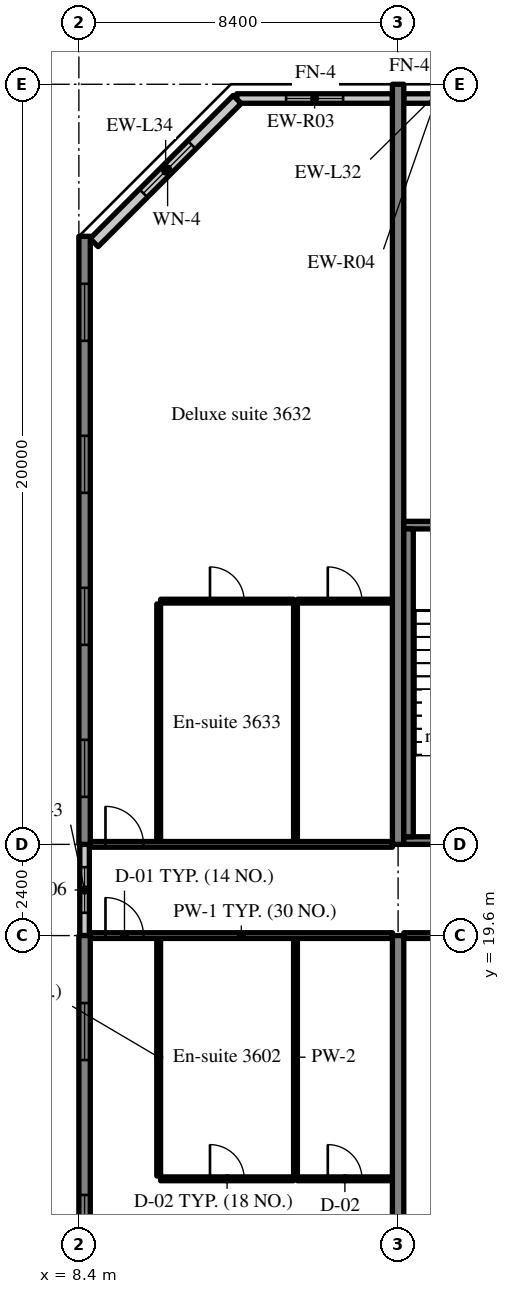
"""IFC4 building model, lengths in metres.
Left out: names, types, materials, properties, quantities, classifications, styles, units other than length and angle.
Written with IfcOpenShell. Run it as: python <this file> out.ifc"""

import sys

from ifc_helpers import new_model, si_unit, direction, frame, frame_2d, origin, place, context, subcontext, project, spatial, rectangle, extrude, source, transform, mapped, element, fill, save


model = new_model("IFC4")
c1 = context("Model", 3, precision=1e-05, world=origin(), true_north=direction((0.0, 1.0)))
c2 = subcontext(c1, "Body", "Model", "MODEL_VIEW")
j1 = project(units=[si_unit("LENGTHUNIT", "METRE"), si_unit("PLANEANGLEUNIT", "RADIAN")], contexts=[c1])
p1 = place(None, origin())
s1 = spatial("IfcSite", under=j1, at=p1, CompositionType="ELEMENT")
p2 = place(p1, origin())
s2 = spatial("IfcBuilding", under=s1, at=p2, CompositionType="ELEMENT")
p3 = place(p2, frame((0.0, 0.0, 151.6)))
s3 = spatial("IfcBuildingStorey", under=s2, at=p3, CompositionType="ELEMENT", Elevation=151.6)
m1 = source(origin(), c2, "Body", "SweptSolid", [
    extrude(rectangle(XDim=10.1, YDim=0.3, at=frame_2d((5.05, 0.0))), origin(), (0.0, 0.0, 1.0), 3.52),
])
p4 = place(p3, frame((8.55, 9.5, 0.0), z_axis=(0.0, 0.0, 1.0), x_axis=(0.0, 1.0, 0.0)))
e1 = element("IfcWall", 1, at=p4, inside=s3, PredefinedType="SHEAR", context=c2, shape_type="MappedRepresentation", body=[
    mapped(m1, transform((0.0, 0.0, 0.0), scale=1.0)),
])
m2 = source(origin(), c2, "Body", "SweptSolid", [
    extrude(rectangle(XDim=1.5, YDim=1.5, at=frame_2d((0.75, 0.75))), frame((0.0, 0.16, 0.0), z_axis=(0.0, -1.0, 0.0), x_axis=(1.0, 0.0, 0.0)), (0.0, 0.0, 1.0), 0.32),
])
p5 = place(p4, frame((1.775, 0.0, 0.9)))
e2 = element("IfcOpeningElement", 2, at=p5, cuts=e1, PredefinedType="OPENING", context=c2, shape_type="MappedRepresentation", body=[
    mapped(m2, transform((0.0, 0.0, 0.0), scale=1.0)),
])
p6 = place(p4, frame((6.825, 0.0, 0.9)))
e3 = element("IfcOpeningElement", 3, at=p6, cuts=e1, PredefinedType="OPENING", context=c2, shape_type="MappedRepresentation", body=[
    mapped(m2, transform((0.0, 0.0, 0.0), scale=1.0)),
])
m3 = source(origin(), c2, "Body", "SweptSolid", [
    extrude(rectangle(XDim=16.0, YDim=0.3, at=frame_2d((8.0, 0.0))), origin(), (0.0, 0.0, 1.0), 3.52),
])
p7 = place(p3, frame((8.55, 22.0, 0.0), z_axis=(0.0, 0.0, 1.0), x_axis=(0.0, 1.0, 0.0)))
e4 = element("IfcWall", 4, at=p7, inside=s3, PredefinedType="SHEAR", context=c2, shape_type="MappedRepresentation", body=[
    mapped(m3, transform((0.0, 0.0, 0.0), scale=1.0)),
])
p8 = place(p7, frame((1.25, 0.0, 0.9)))
e5 = element("IfcOpeningElement", 5, at=p8, cuts=e4, PredefinedType="OPENING", context=c2, shape_type="MappedRepresentation", body=[
    mapped(m2, transform((0.0, 0.0, 0.0), scale=1.0)),
])
p9 = place(p7, frame((5.25, 0.0, 0.9)))
e6 = element("IfcOpeningElement", 6, at=p9, cuts=e4, PredefinedType="OPENING", context=c2, shape_type="MappedRepresentation", body=[
    mapped(m2, transform((0.0, 0.0, 0.0), scale=1.0)),
])
p10 = place(p7, frame((9.25, 0.0, 0.9)))
e7 = element("IfcOpeningElement", 7, at=p10, cuts=e4, PredefinedType="OPENING", context=c2, shape_type="MappedRepresentation", body=[
    mapped(m2, transform((0.0, 0.0, 0.0), scale=1.0)),
])
p11 = place(p7, frame((13.25, 0.0, 0.9)))
e8 = element("IfcOpeningElement", 8, at=p11, cuts=e4, PredefinedType="OPENING", context=c2, shape_type="MappedRepresentation", body=[
    mapped(m2, transform((0.0, 0.0, 0.0), scale=1.0)),
])
m4 = source(origin(), c2, "Body", "SweptSolid", [
    extrude(rectangle(XDim=14.1, YDim=0.3, at=frame_2d((7.05, 0.0))), origin(), (0.0, 0.0, 1.0), 3.52),
])
p12 = place(p3, frame((16.8, 5.5, 0.0), z_axis=(0.0, 0.0, 1.0), x_axis=(0.0, 1.0, 0.0)))
e9 = element("IfcWall", 9, at=p12, inside=s3, PredefinedType="SHEAR", context=c2, shape_type="MappedRepresentation", body=[
    mapped(m4, transform((0.0, 0.0, 0.0), scale=1.0)),
])
m5 = source(origin(), c2, "Body", "SweptSolid", [
    extrude(rectangle(XDim=20.0, YDim=0.3, at=frame_2d((10.0, 0.0))), origin(), (0.0, 0.0, 1.0), 3.52),
])
p13 = place(p3, frame((16.8, 22.0, 0.0), z_axis=(0.0, 0.0, 1.0), x_axis=(0.0, 1.0, 0.0)))
e10 = element("IfcWall", 10, at=p13, inside=s3, PredefinedType="SHEAR", context=c2, shape_type="MappedRepresentation", body=[
    mapped(m5, transform((0.0, 0.0, 0.0), scale=1.0)),
])
m6 = source(origin(), c2, "Body", "SweptSolid", [
    extrude(rectangle(XDim=4.094, YDim=0.25, at=frame_2d((2.047, 0.0))), origin(), (0.0, 0.0, 1.0), 2.87),
])
p14 = place(p3, frame((16.65, 41.625, 0.0), z_axis=(0.0, 0.0, 1.0), x_axis=(-1.0, 0.0, 0.0)))
e11 = element("IfcWall", 11, at=p14, inside=s3, PredefinedType="SOLIDWALL", context=c2, shape_type="MappedRepresentation", body=[
    mapped(m6, transform((0.0, 0.0, 0.0), scale=1.0)),
])
m7 = source(origin(), c2, "Body", "SweptSolid", [
    extrude(rectangle(XDim=1.5, YDim=1.5, at=frame_2d((0.75, 0.75))), frame((0.0, 0.135, 0.0), z_axis=(0.0, -1.0, 0.0), x_axis=(1.0, 0.0, 0.0)), (0.0, 0.0, 1.0), 0.27),
])
p15 = place(p14, frame((1.297, 0.0, 0.9)))
e12 = element("IfcOpeningElement", 12, at=p15, cuts=e11, PredefinedType="OPENING", context=c2, shape_type="MappedRepresentation", body=[
    mapped(m7, transform((0.0, 0.0, 0.0), scale=1.0)),
])
m8 = source(origin(), c2, "Body", "SweptSolid", [
    extrude(rectangle(XDim=1.708, YDim=0.25, at=frame_2d((0.854, 0.0))), origin(), (0.0, 0.0, 1.0), 2.87),
])
p16 = place(p3, frame((18.658, 41.625, 0.0), z_axis=(0.0, 0.0, 1.0), x_axis=(-1.0, 0.0, 0.0)))
e13 = element("IfcWall", 13, at=p16, inside=s3, PredefinedType="SOLIDWALL", context=c2, shape_type="MappedRepresentation", body=[
    mapped(m8, transform((0.0, 0.0, 0.0), scale=1.0)),
])
m9 = source(origin(), c2, "Body", "SweptSolid", [
    extrude(rectangle(XDim=5.326, YDim=0.3, at=frame_2d((2.663, 0.0))), origin(), (0.0, 0.0, 1.0), 3.52),
])
p17 = place(p3, frame((12.566, 41.6, 0.0), z_axis=(0.0, 0.0, 1.0), x_axis=(-0.707083859269, -0.707129702361, 0.0)))
e14 = element("IfcWall", 14, at=p17, inside=s3, PredefinedType="SOLIDWALL", context=c2, shape_type="MappedRepresentation", body=[
    mapped(m9, transform((0.0, 0.0, 0.0), scale=1.0)),
])
m10 = source(origin(), c2, "Body", "SweptSolid", [
    extrude(rectangle(XDim=1.8, YDim=1.5, at=frame_2d((0.9, 0.75))), frame((0.0, 0.16, 0.0), z_axis=(0.0, -1.0, 0.0), x_axis=(1.0, 0.0, 0.0)), (0.0, 0.0, 1.0), 0.32),
])
p18 = place(p17, frame((1.689, 0.0, 0.9)))
e15 = element("IfcOpeningElement", 15, at=p18, cuts=e14, PredefinedType="OPENING", context=c2, shape_type="MappedRepresentation", body=[
    mapped(m10, transform((0.0, 0.0, 0.0), scale=1.0)),
])
m11 = source(origin(), c2, "Body", "SweptSolid", [
    extrude(rectangle(XDim=2.4, YDim=0.25, at=frame_2d((1.2, 0.0))), origin(), (0.0, 0.0, 1.0), 2.62),
])
p19 = place(p3, frame((8.55, 19.6, 0.0), z_axis=(0.0, 0.0, 1.0), x_axis=(0.0, 1.0, 0.0)))
e16 = element("IfcWall", 16, at=p19, inside=s3, PredefinedType="SOLIDWALL", context=c2, shape_type="MappedRepresentation", body=[
    mapped(m11, transform((0.0, 0.0, 0.0), scale=1.0)),
])
m12 = source(origin(), c2, "Body", "SweptSolid", [
    extrude(rectangle(XDim=1.2, YDim=1.5, at=frame_2d((0.6, 0.75))), frame((0.0, 0.135, 0.0), z_axis=(0.0, -1.0, 0.0), x_axis=(1.0, 0.0, 0.0)), (0.0, 0.0, 1.0), 0.27),
])
p20 = place(p19, frame((0.6, 0.0, 0.9)))
e17 = element("IfcOpeningElement", 17, at=p20, cuts=e16, PredefinedType="OPENING", context=c2, shape_type="MappedRepresentation", body=[
    mapped(m12, transform((0.0, 0.0, 0.0), scale=1.0)),
])
m13 = source(origin(), c2, "Body", "SweptSolid", [
    extrude(rectangle(XDim=8.25, YDim=0.2, at=frame_2d((4.125, 0.0))), origin(), (0.0, 0.0, 1.0), 3.52),
])
p21 = place(p3, frame((16.95, 22.1, 0.0), z_axis=(0.0, 0.0, 1.0), x_axis=(1.0, 0.0, 0.0)))
e18 = element("IfcWall", 18, at=p21, inside=s3, PredefinedType="SOLIDWALL", context=c2, shape_type="MappedRepresentation", body=[
    mapped(m13, transform((0.0, 0.0, 0.0), scale=1.0)),
])
m14 = source(origin(), c2, "Body", "SweptSolid", [
    extrude(rectangle(XDim=1.2, YDim=2.1, at=frame_2d((0.6, 1.05))), frame((0.0, 0.11, 0.0), z_axis=(0.0, -1.0, 0.0), x_axis=(1.0, 0.0, 0.0)), (0.0, 0.0, 1.0), 0.22),
])
p22 = place(p21, frame((6.05, 0.0, 0.0)))
e19 = element("IfcOpeningElement", 19, at=p22, cuts=e18, PredefinedType="OPENING", context=c2, shape_type="MappedRepresentation", body=[
    mapped(m14, transform((0.0, 0.0, 0.0), scale=1.0)),
])
p23 = place(p3, frame((16.95, 30.4, 0.0), z_axis=(0.0, 0.0, 1.0), x_axis=(1.0, 0.0, 0.0)))
e20 = element("IfcWall", 20, at=p23, inside=s3, PredefinedType="SOLIDWALL", context=c2, shape_type="MappedRepresentation", body=[
    mapped(m13, transform((0.0, 0.0, 0.0), scale=1.0)),
])
m15 = source(origin(), c2, "Body", "SweptSolid", [
    extrude(rectangle(XDim=1.0, YDim=2.1, at=frame_2d((0.5, 1.05))), frame((0.0, 0.11, 0.0), z_axis=(0.0, -1.0, 0.0), x_axis=(1.0, 0.0, 0.0)), (0.0, 0.0, 1.0), 0.22),
])
p24 = place(p23, frame((6.15, 0.0, 0.0)))
e21 = element("IfcOpeningElement", 21, at=p24, cuts=e20, PredefinedType="OPENING", context=c2, shape_type="MappedRepresentation", body=[
    mapped(m15, transform((0.0, 0.0, 0.0), scale=1.0)),
])
m16 = source(origin(), c2, "Body", "SweptSolid", [
    extrude(rectangle(XDim=8.1, YDim=0.25, at=frame_2d((4.05, 0.0))), origin(), (0.0, 0.0, 1.0), 3.52),
])
p25 = place(p3, frame((17.075, 22.2, 0.0), z_axis=(0.0, 0.0, 1.0), x_axis=(0.0, 1.0, 0.0)))
e22 = element("IfcWall", 22, at=p25, inside=s3, PredefinedType="SOLIDWALL", context=c2, shape_type="MappedRepresentation", body=[
    mapped(m16, transform((0.0, 0.0, 0.0), scale=1.0)),
])
m17 = source(origin(), c2, "Body", "SweptSolid", [
    extrude(rectangle(XDim=6.25, YDim=0.1, at=frame_2d((3.125, 0.0))), origin(), (0.0, 0.0, 1.0), 3.52),
])
for number, where, z_axis, x_axis in (
    (23, (10.5, 13.275, 0.0), (0.0, 0.0, 1.0), (0.0, 1.0, 0.0)),
    (24, (14.1, 13.275, 0.0), (0.0, 0.0, 1.0), (0.0, 1.0, 0.0)),
):
    element("IfcWall", number, at=place(p3, frame(where, z_axis=z_axis, x_axis=x_axis)), inside=s3, PredefinedType="PARTITIONING", context=c2, shape_type="MappedRepresentation", body=[
        mapped(m17, transform((0.0, 0.0, 0.0), scale=1.0)),
    ])
m18 = source(origin(), c2, "Body", "SweptSolid", [
    extrude(rectangle(XDim=3.5, YDim=0.1, at=frame_2d((1.75, 0.0))), origin(), (0.0, 0.0, 1.0), 3.52),
])
p26 = place(p3, frame((10.55, 13.2, 0.0), z_axis=(0.0, 0.0, 1.0), x_axis=(1.0, 0.0, 0.0)))
e25 = element("IfcWall", 25, at=p26, inside=s3, PredefinedType="PARTITIONING", context=c2, shape_type="MappedRepresentation", body=[
    mapped(m18, transform((0.0, 0.0, 0.0), scale=1.0)),
])
m19 = source(origin(), c2, "Body", "SweptSolid", [
    extrude(rectangle(XDim=0.9, YDim=2.1, at=frame_2d((0.45, 1.05))), frame((0.0, 0.06, 0.0), z_axis=(0.0, -1.0, 0.0), x_axis=(1.0, 0.0, 0.0)), (0.0, 0.0, 1.0), 0.12),
])
p27 = place(p26, frame((1.3, 0.0, 0.0)))
e26 = element("IfcOpeningElement", 26, at=p27, cuts=e25, PredefinedType="OPENING", context=c2, shape_type="MappedRepresentation", body=[
    mapped(m19, transform((0.0, 0.0, 0.0), scale=1.0)),
])
m20 = source(origin(), c2, "Body", "SweptSolid", [
    extrude(rectangle(XDim=2.5, YDim=0.1, at=frame_2d((1.25, 0.0))), origin(), (0.0, 0.0, 1.0), 3.52),
])
p28 = place(p3, frame((14.15, 13.2, 0.0), z_axis=(0.0, 0.0, 1.0), x_axis=(1.0, 0.0, 0.0)))
e27 = element("IfcWall", 27, at=p28, inside=s3, PredefinedType="PARTITIONING", context=c2, shape_type="MappedRepresentation", body=[
    mapped(m20, transform((0.0, 0.0, 0.0), scale=1.0)),
])
p29 = place(p28, frame((0.8, 0.0, 0.0)))
e28 = element("IfcOpeningElement", 28, at=p29, cuts=e27, PredefinedType="OPENING", context=c2, shape_type="MappedRepresentation", body=[
    mapped(m19, transform((0.0, 0.0, 0.0), scale=1.0)),
])
m21 = source(origin(), c2, "Body", "SweptSolid", [
    extrude(rectangle(XDim=7.95, YDim=0.15, at=frame_2d((3.975, 0.0))), origin(), (0.0, 0.0, 1.0), 2.82),
])
p30 = place(p3, frame((8.7, 19.6, 0.0), z_axis=(0.0, 0.0, 1.0), x_axis=(1.0, 0.0, 0.0)))
e29 = element("IfcWall", 29, at=p30, inside=s3, PredefinedType="PARTITIONING", context=c2, shape_type="MappedRepresentation", body=[
    mapped(m21, transform((0.0, 0.0, 0.0), scale=1.0)),
])
m22 = source(origin(), c2, "Body", "SweptSolid", [
    extrude(rectangle(XDim=1.0, YDim=2.1, at=frame_2d((0.5, 1.05))), frame((0.0, 0.085, 0.0), z_axis=(0.0, -1.0, 0.0), x_axis=(1.0, 0.0, 0.0)), (0.0, 0.0, 1.0), 0.17),
])
p31 = place(p30, frame((0.4, 0.0, 0.0)))
e30 = element("IfcOpeningElement", 30, at=p31, cuts=e29, PredefinedType="OPENING", context=c2, shape_type="MappedRepresentation", body=[
    mapped(m22, transform((0.0, 0.0, 0.0), scale=1.0)),
])
m23 = source(origin(), c2, "Body", "SweptSolid", [
    extrude(rectangle(XDim=8.1, YDim=0.15, at=frame_2d((4.05, 0.0))), origin(), (0.0, 0.0, 1.0), 2.82),
])
p32 = place(p3, frame((16.95, 19.6, 0.0), z_axis=(0.0, 0.0, 1.0), x_axis=(1.0, 0.0, 0.0)))
e31 = element("IfcWall", 31, at=p32, inside=s3, PredefinedType="PARTITIONING", context=c2, shape_type="MappedRepresentation", body=[
    mapped(m23, transform((0.0, 0.0, 0.0), scale=1.0)),
])
m24 = source(origin(), c2, "Body", "SweptSolid", [
    extrude(rectangle(XDim=1.8, YDim=2.1, at=frame_2d((0.9, 1.05))), frame((0.0, 0.085, 0.0), z_axis=(0.0, -1.0, 0.0), x_axis=(1.0, 0.0, 0.0)), (0.0, 0.0, 1.0), 0.17),
])
p33 = place(p32, frame((3.15, 0.0, 0.0)))
e32 = element("IfcOpeningElement", 32, at=p33, cuts=e31, PredefinedType="OPENING", context=c2, shape_type="MappedRepresentation", body=[
    mapped(m24, transform((0.0, 0.0, 0.0), scale=1.0)),
])
for number, where, z_axis, x_axis in (
    (33, (10.5, 22.075, 0.0), (0.0, 0.0, 1.0), (0.0, 1.0, 0.0)),
    (34, (14.1, 22.075, 0.0), (0.0, 0.0, 1.0), (0.0, 1.0, 0.0)),
):
    element("IfcWall", number, at=place(p3, frame(where, z_axis=z_axis, x_axis=x_axis)), inside=s3, PredefinedType="PARTITIONING", context=c2, shape_type="MappedRepresentation", body=[
        mapped(m17, transform((0.0, 0.0, 0.0), scale=1.0)),
    ])
p34 = place(p3, frame((10.55, 28.4, 0.0), z_axis=(0.0, 0.0, 1.0), x_axis=(1.0, 0.0, 0.0)))
e35 = element("IfcWall", 35, at=p34, inside=s3, PredefinedType="PARTITIONING", context=c2, shape_type="MappedRepresentation", body=[
    mapped(m18, transform((0.0, 0.0, 0.0), scale=1.0)),
])
p35 = place(p34, frame((1.3, 0.0, 0.0)))
e36 = element("IfcOpeningElement", 36, at=p35, cuts=e35, PredefinedType="OPENING", context=c2, shape_type="MappedRepresentation", body=[
    mapped(m19, transform((0.0, 0.0, 0.0), scale=1.0)),
])
p36 = place(p3, frame((14.15, 28.4, 0.0), z_axis=(0.0, 0.0, 1.0), x_axis=(1.0, 0.0, 0.0)))
e37 = element("IfcWall", 37, at=p36, inside=s3, PredefinedType="PARTITIONING", context=c2, shape_type="MappedRepresentation", body=[
    mapped(m20, transform((0.0, 0.0, 0.0), scale=1.0)),
])
p37 = place(p36, frame((0.8, 0.0, 0.0)))
e38 = element("IfcOpeningElement", 38, at=p37, cuts=e37, PredefinedType="OPENING", context=c2, shape_type="MappedRepresentation", body=[
    mapped(m19, transform((0.0, 0.0, 0.0), scale=1.0)),
])
p38 = place(p3, frame((8.7, 22.0, 0.0), z_axis=(0.0, 0.0, 1.0), x_axis=(1.0, 0.0, 0.0)))
e39 = element("IfcWall", 39, at=p38, inside=s3, PredefinedType="PARTITIONING", context=c2, shape_type="MappedRepresentation", body=[
    mapped(m21, transform((0.0, 0.0, 0.0), scale=1.0)),
])
p39 = place(p38, frame((0.4, 0.0, 0.0)))
e40 = element("IfcOpeningElement", 40, at=p39, cuts=e39, PredefinedType="OPENING", context=c2, shape_type="MappedRepresentation", body=[
    mapped(m22, transform((0.0, 0.0, 0.0), scale=1.0)),
])
m25 = source(origin(), c2, "Body", "SweptSolid", [
    extrude(rectangle(XDim=1.5, YDim=1.5, at=frame_2d((0.75, 0.75))), frame((0.0, 0.03, 0.0), z_axis=(0.0, -1.0, 0.0), x_axis=(1.0, 0.0, 0.0)), (0.0, 0.0, 1.0), 0.06),
])
p40 = place(p15, origin())
e41 = element("IfcWindow", 41, at=p40, inside=s3, PartitioningType="SINGLE_PANEL", PredefinedType="WINDOW", context=c2, shape_type="MappedRepresentation", body=[
    mapped(m25, transform((0.0, 0.0, 0.0), scale=1.0)),
])
fill(e12, e41)
m26 = source(origin(), c2, "Body", "SweptSolid", [
    extrude(rectangle(XDim=1.8, YDim=1.5, at=frame_2d((0.9, 0.75))), frame((0.0, 0.03, 0.0), z_axis=(0.0, -1.0, 0.0), x_axis=(1.0, 0.0, 0.0)), (0.0, 0.0, 1.0), 0.06),
])
p41 = place(p18, origin())
e42 = element("IfcWindow", 42, at=p41, inside=s3, PartitioningType="SINGLE_PANEL", PredefinedType="WINDOW", context=c2, shape_type="MappedRepresentation", body=[
    mapped(m26, transform((0.0, 0.0, 0.0), scale=1.0)),
])
fill(e15, e42)
p42 = place(p5, origin())
e43 = element("IfcWindow", 43, at=p42, inside=s3, PartitioningType="SINGLE_PANEL", PredefinedType="WINDOW", context=c2, shape_type="MappedRepresentation", body=[
    mapped(m25, transform((0.0, 0.0, 0.0), scale=1.0)),
])
fill(e2, e43)
p43 = place(p6, origin())
e44 = element("IfcWindow", 44, at=p43, inside=s3, PartitioningType="SINGLE_PANEL", PredefinedType="WINDOW", context=c2, shape_type="MappedRepresentation", body=[
    mapped(m25, transform((0.0, 0.0, 0.0), scale=1.0)),
])
fill(e3, e44)
p44 = place(p8, origin())
e45 = element("IfcWindow", 45, at=p44, inside=s3, PartitioningType="SINGLE_PANEL", PredefinedType="WINDOW", context=c2, shape_type="MappedRepresentation", body=[
    mapped(m25, transform((0.0, 0.0, 0.0), scale=1.0)),
])
fill(e5, e45)
p45 = place(p9, origin())
e46 = element("IfcWindow", 46, at=p45, inside=s3, PartitioningType="SINGLE_PANEL", PredefinedType="WINDOW", context=c2, shape_type="MappedRepresentation", body=[
    mapped(m25, transform((0.0, 0.0, 0.0), scale=1.0)),
])
fill(e6, e46)
p46 = place(p10, origin())
e47 = element("IfcWindow", 47, at=p46, inside=s3, PartitioningType="SINGLE_PANEL", PredefinedType="WINDOW", context=c2, shape_type="MappedRepresentation", body=[
    mapped(m25, transform((0.0, 0.0, 0.0), scale=1.0)),
])
fill(e7, e47)
p47 = place(p11, origin())
e48 = element("IfcWindow", 48, at=p47, inside=s3, PartitioningType="SINGLE_PANEL", PredefinedType="WINDOW", context=c2, shape_type="MappedRepresentation", body=[
    mapped(m25, transform((0.0, 0.0, 0.0), scale=1.0)),
])
fill(e8, e48)
m27 = source(origin(), c2, "Body", "SweptSolid", [
    extrude(rectangle(XDim=1.2, YDim=1.5, at=frame_2d((0.6, 0.75))), frame((0.0, 0.03, 0.0), z_axis=(0.0, -1.0, 0.0), x_axis=(1.0, 0.0, 0.0)), (0.0, 0.0, 1.0), 0.06),
])
p48 = place(p20, origin())
e49 = element("IfcWindow", 49, at=p48, inside=s3, PartitioningType="SINGLE_PANEL", PredefinedType="WINDOW", context=c2, shape_type="MappedRepresentation", body=[
    mapped(m27, transform((0.0, 0.0, 0.0), scale=1.0)),
])
fill(e17, e49)
m28 = source(origin(), c2, "Body", "SweptSolid", [
    extrude(rectangle(XDim=0.9, YDim=2.1, at=frame_2d((0.45, 1.05))), frame((0.0, 0.025, 0.0), z_axis=(0.0, -1.0, 0.0), x_axis=(1.0, 0.0, 0.0)), (0.0, 0.0, 1.0), 0.05),
])
p49 = place(p27, origin())
e50 = element("IfcDoor", 50, at=p49, inside=s3, OperationType="SINGLE_SWING_LEFT", PredefinedType="DOOR", context=c2, shape_type="MappedRepresentation", body=[
    mapped(m28, transform((0.0, 0.0, 0.0), scale=1.0)),
])
fill(e26, e50)
p50 = place(p29, origin())
e51 = element("IfcDoor", 51, at=p50, inside=s3, OperationType="SINGLE_SWING_LEFT", PredefinedType="DOOR", context=c2, shape_type="MappedRepresentation", body=[
    mapped(m28, transform((0.0, 0.0, 0.0), scale=1.0)),
])
fill(e28, e51)
m29 = source(origin(), c2, "Body", "SweptSolid", [
    extrude(rectangle(XDim=1.0, YDim=2.1, at=frame_2d((0.5, 1.05))), frame((0.0, 0.025, 0.0), z_axis=(0.0, -1.0, 0.0), x_axis=(1.0, 0.0, 0.0)), (0.0, 0.0, 1.0), 0.05),
])
p51 = place(p31, origin())
e52 = element("IfcDoor", 52, at=p51, inside=s3, OperationType="SINGLE_SWING_LEFT", PredefinedType="DOOR", context=c2, shape_type="MappedRepresentation", body=[
    mapped(m29, transform((0.0, 0.0, 0.0), scale=1.0)),
])
fill(e30, e52)
p52 = place(p35, origin())
e53 = element("IfcDoor", 53, at=p52, inside=s3, OperationType="SINGLE_SWING_LEFT", PredefinedType="DOOR", context=c2, shape_type="MappedRepresentation", body=[
    mapped(m28, transform((0.0, 0.0, 0.0), scale=1.0)),
])
fill(e36, e53)
p53 = place(p37, origin())
e54 = element("IfcDoor", 54, at=p53, inside=s3, OperationType="SINGLE_SWING_LEFT", PredefinedType="DOOR", context=c2, shape_type="MappedRepresentation", body=[
    mapped(m28, transform((0.0, 0.0, 0.0), scale=1.0)),
])
fill(e38, e54)
p54 = place(p39, origin())
e55 = element("IfcDoor", 55, at=p54, inside=s3, OperationType="SINGLE_SWING_LEFT", PredefinedType="DOOR", context=c2, shape_type="MappedRepresentation", body=[
    mapped(m29, transform((0.0, 0.0, 0.0), scale=1.0)),
])
fill(e40, e55)
save(model, sys.argv[1])
